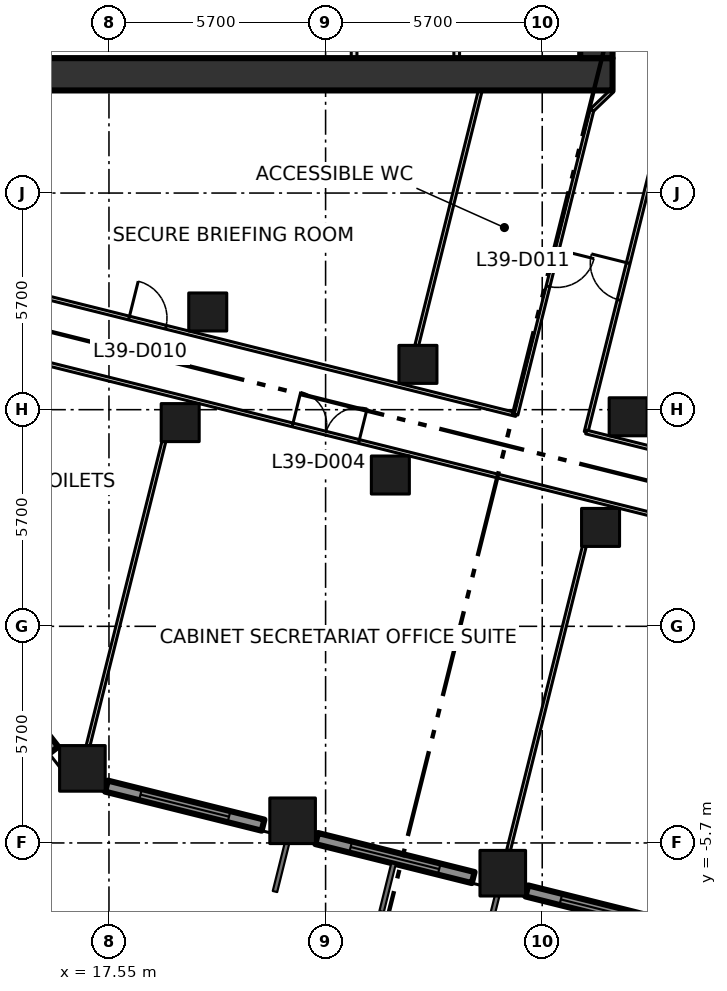
"""IFC4 building model, lengths in metres.
Left out: names, types, materials, properties, quantities, classifications, styles, units other than length and angle.
Written with IfcOpenShell. Run it as: python <this file> out.ifc"""

import sys

from ifc_helpers import new_model, si_unit, direction, frame, frame_2d, origin, origin_2d, place, context, subcontext, project, spatial, rectangle, extrude, element, fill, save


model = new_model("IFC4")
c1 = context("Model", 3, precision=1e-05, world=origin(), true_north=direction((0.0, 1.0)))
c2 = subcontext(c1, "Body", "Model", "MODEL_VIEW")
j1 = project(units=[si_unit("LENGTHUNIT", "METRE"), si_unit("PLANEANGLEUNIT", "RADIAN")], contexts=[c1])
p1 = place(None, origin())
s1 = spatial("IfcSite", under=j1, at=p1, CompositionType="ELEMENT")
p2 = place(p1, origin())
s2 = spatial("IfcBuilding", under=s1, at=p2, CompositionType="ELEMENT")
p3 = place(p2, frame((0.0, 0.0, 174.0)))
s3 = spatial("IfcBuildingStorey", under=s2, at=p3, CompositionType="ELEMENT", Elevation=174.0)
for number, where, z_axis, x_axis in (
    (1, (16.851, -3.738, 0.0), (0.0, 0.0, 1.0), (1.0, 0.0, 0.0)),
    (2, (22.382, -5.117, 0.0), (0.0, 0.0, 1.0), (1.0, 0.0, 0.0)),
    (3, (27.912, -6.496, 0.0), (0.0, 0.0, 1.0), (1.0, 0.0, 0.0)),
):
    element("IfcColumn", number, at=place(p3, frame(where, z_axis=z_axis, x_axis=x_axis)), inside=s3, PredefinedType="COLUMN", context=c2, shape_type="SweptSolid", body=[
        extrude(rectangle(XDim=1.2, YDim=1.2, at=origin_2d()), origin(), (0.0, 0.0, 1.0), 4.2),
    ])
for number, where, z_axis, x_axis in (
    (4, (19.424, 5.36, 0.0), (0.0, 0.0, 1.0), (1.0, 0.0, 0.0)),
    (5, (24.954, 3.981, 0.0), (0.0, 0.0, 1.0), (1.0, 0.0, 0.0)),
    (6, (30.485, 2.602, 0.0), (0.0, 0.0, 1.0), (1.0, 0.0, 0.0)),
    (7, (20.149, 8.271, 0.0), (0.0, 0.0, 1.0), (1.0, 0.0, 0.0)),
    (8, (25.68, 6.892, 0.0), (0.0, 0.0, 1.0), (1.0, 0.0, 0.0)),
    (9, (31.211, 5.513, 0.0), (0.0, 0.0, 1.0), (1.0, 0.0, 0.0)),
):
    element("IfcColumn", number, at=place(p3, frame(where, z_axis=z_axis, x_axis=x_axis)), inside=s3, PredefinedType="COLUMN", context=c2, shape_type="SweptSolid", body=[
        extrude(rectangle(XDim=1.0, YDim=1.0, at=origin_2d()), origin(), (0.0, 0.0, 1.0), 4.2),
    ])
p4 = place(p3, frame((8.0, 14.525, -0.3), z_axis=(0.0, 0.0, 1.0), x_axis=(1.0, 0.0, 0.0)))
e10 = element("IfcWall", 10, at=p4, inside=s3, PredefinedType="SHEAR", context=c2, shape_type="SweptSolid", body=[
    extrude(rectangle(XDim=22.8, YDim=0.85, at=frame_2d((11.4, 0.0))), origin(), (0.0, 0.0, 1.0), 4.2),
])
p5 = place(p4, frame((2.3, 0.0, 0.3)))
e11 = element("IfcOpeningElement", 11, at=p5, cuts=e10, PredefinedType="OPENING", context=c2, shape_type="SweptSolid", body=[
    extrude(rectangle(XDim=1.8, YDim=2.1, at=frame_2d((0.9, 1.05))), frame((0.0, 0.435, 0.0), z_axis=(0.0, -1.0, 0.0), x_axis=(1.0, 0.0, 0.0)), (0.0, 0.0, 1.0), 0.87),
])
p6 = place(p3, frame((30.375, 14.95, -0.3), z_axis=(0.0, 0.0, 1.0), x_axis=(0.0, 1.0, 0.0)))
e12 = element("IfcWall", 12, at=p6, inside=s3, PredefinedType="SHEAR", context=c2, shape_type="SweptSolid", body=[
    extrude(rectangle(XDim=20.75, YDim=0.85, at=frame_2d((10.375, 0.0))), origin(), (0.0, 0.0, 1.0), 4.2),
])
for number, where, z_axis, x_axis in (
    (13, (24.0, 14.95, 0.0), (0.0, 0.0, 1.0), (0.0, 1.0, 0.0)),
    (14, (26.7, 14.95, 0.0), (0.0, 0.0, 1.0), (0.0, 1.0, 0.0)),
):
    element("IfcWall", number, at=place(p3, frame(where, z_axis=z_axis, x_axis=x_axis)), inside=s3, PredefinedType="PARTITIONING", context=c2, shape_type="SweptSolid", body=[
        extrude(rectangle(XDim=2.675, YDim=0.15, at=frame_2d((1.337, 0.0))), origin(), (0.0, 0.0, 1.0), 3.9),
    ])
p7 = place(p3, frame((13.624, -0.094, 0.0), z_axis=(0.0, 0.0, 1.0), x_axis=(0.615526062586, -0.7881165309, 0.0)))
e15 = element("IfcWall", 15, at=p7, inside=s3, PredefinedType="SOLIDWALL", context=c2, shape_type="SweptSolid", body=[
    extrude(rectangle(XDim=4.016, YDim=0.3, at=frame_2d((2.008, 0.0))), origin(), (0.0, 0.0, 1.0), 3.15),
])
p8 = place(p7, frame((0.808, 0.0, 0.8)))
e16 = element("IfcOpeningElement", 16, at=p8, cuts=e15, PredefinedType="OPENING", context=c2, shape_type="SweptSolid", body=[
    extrude(rectangle(XDim=2.4, YDim=2.1, at=frame_2d((1.2, 1.05))), frame((0.0, 0.16, 0.0), z_axis=(0.0, -1.0, 0.0), x_axis=(1.0, 0.0, 0.0)), (0.0, 0.0, 1.0), 0.32),
])
p9 = place(p3, frame((17.484, -4.205, 0.0), z_axis=(0.0, 0.0, 1.0), x_axis=(0.970318118028, -0.241832069473, 0.0)))
e17 = element("IfcWall", 17, at=p9, inside=s3, PredefinedType="SOLIDWALL", context=c2, shape_type="SweptSolid", body=[
    extrude(rectangle(XDim=4.246, YDim=0.3, at=frame_2d((2.123, 0.0))), origin(), (0.0, 0.0, 1.0), 3.15),
])
p10 = place(p9, frame((0.923, 0.0, 0.8)))
e18 = element("IfcOpeningElement", 18, at=p10, cuts=e17, PredefinedType="OPENING", context=c2, shape_type="SweptSolid", body=[
    extrude(rectangle(XDim=2.4, YDim=2.1, at=frame_2d((1.2, 1.05))), frame((0.0, 0.16, 0.0), z_axis=(0.0, -1.0, 0.0), x_axis=(1.0, 0.0, 0.0)), (0.0, 0.0, 1.0), 0.32),
])
p11 = place(p3, frame((23.015, -5.584, 0.0), z_axis=(0.0, 0.0, 1.0), x_axis=(0.970291164166, -0.241940192487, 0.0)))
e19 = element("IfcWall", 19, at=p11, inside=s3, PredefinedType="SOLIDWALL", context=c2, shape_type="SweptSolid", body=[
    extrude(rectangle(XDim=4.245, YDim=0.3, at=frame_2d((2.123, 0.0))), origin(), (0.0, 0.0, 1.0), 3.15),
])
p12 = place(p11, frame((0.922, 0.0, 0.8)))
e20 = element("IfcOpeningElement", 20, at=p12, cuts=e19, PredefinedType="OPENING", context=c2, shape_type="SweptSolid", body=[
    extrude(rectangle(XDim=2.4, YDim=2.1, at=frame_2d((1.2, 1.05))), frame((0.0, 0.16, 0.0), z_axis=(0.0, -1.0, 0.0), x_axis=(1.0, 0.0, 0.0)), (0.0, 0.0, 1.0), 0.32),
])
p13 = place(p3, frame((28.545, -6.963, 0.0), z_axis=(0.0, 0.0, 1.0), x_axis=(0.97030462482, -0.241886202691, 0.0)))
e21 = element("IfcWall", 21, at=p13, inside=s3, PredefinedType="SOLIDWALL", context=c2, shape_type="SweptSolid", body=[
    extrude(rectangle(XDim=4.246, YDim=0.3, at=frame_2d((2.123, 0.0))), origin(), (0.0, 0.0, 1.0), 3.15),
])
p14 = place(p13, frame((0.923, 0.0, 0.8)))
e22 = element("IfcOpeningElement", 22, at=p14, cuts=e21, PredefinedType="OPENING", context=c2, shape_type="SweptSolid", body=[
    extrude(rectangle(XDim=2.4, YDim=2.1, at=frame_2d((1.2, 1.05))), frame((0.0, 0.16, 0.0), z_axis=(0.0, -1.0, 0.0), x_axis=(1.0, 0.0, 0.0)), (0.0, 0.0, 1.0), 0.32),
])
p15 = place(p3, frame((8.565, 8.744, 0.0), z_axis=(0.0, 0.0, 1.0), x_axis=(0.97029693432, -0.24191705035, 0.0)))
e23 = element("IfcWall", 23, at=p15, inside=s3, PredefinedType="PARTITIONING", context=c2, shape_type="SweptSolid", body=[
    extrude(rectangle(XDim=56.375, YDim=0.1, at=frame_2d((28.187, 0.0))), origin(), (0.0, 0.0, 1.0), 3.9),
])
p16 = place(p15, frame((42.739, 0.0, 0.0)))
e24 = element("IfcOpeningElement", 24, at=p16, cuts=e23, PredefinedType="OPENING", context=c2, shape_type="SweptSolid", body=[
    extrude(rectangle(XDim=1.8, YDim=2.1, at=frame_2d((0.9, 1.05))), frame((0.0, 0.06, 0.0), z_axis=(0.0, -1.0, 0.0), x_axis=(1.0, 0.0, 0.0)), (0.0, 0.0, 1.0), 0.12),
])
p17 = place(p15, frame((14.239, 0.0, 0.0)))
e25 = element("IfcOpeningElement", 25, at=p17, cuts=e23, PredefinedType="OPENING", context=c2, shape_type="SweptSolid", body=[
    extrude(rectangle(XDim=1.8, YDim=2.1, at=frame_2d((0.9, 1.05))), frame((0.0, 0.06, 0.0), z_axis=(0.0, -1.0, 0.0), x_axis=(1.0, 0.0, 0.0)), (0.0, 0.0, 1.0), 0.12),
])
p18 = place(p15, frame((29.74, 0.0, 0.0)))
e26 = element("IfcOpeningElement", 26, at=p18, cuts=e23, PredefinedType="OPENING", context=c2, shape_type="SweptSolid", body=[
    extrude(rectangle(XDim=1.8, YDim=2.1, at=frame_2d((0.9, 1.05))), frame((0.0, 0.06, 0.0), z_axis=(0.0, -1.0, 0.0), x_axis=(1.0, 0.0, 0.0)), (0.0, 0.0, 1.0), 0.12),
])
p19 = place(p15, frame((35.64, 0.0, 0.0)))
e27 = element("IfcOpeningElement", 27, at=p19, cuts=e23, PredefinedType="OPENING", context=c2, shape_type="SweptSolid", body=[
    extrude(rectangle(XDim=1.0, YDim=2.1, at=frame_2d((0.5, 1.05))), frame((0.0, 0.06, 0.0), z_axis=(0.0, -1.0, 0.0), x_axis=(1.0, 0.0, 0.0)), (0.0, 0.0, 1.0), 0.12),
])
p20 = place(p15, frame((5.28, 0.0, 0.0)))
e28 = element("IfcOpeningElement", 28, at=p20, cuts=e23, PredefinedType="OPENING", context=c2, shape_type="SweptSolid", body=[
    extrude(rectangle(XDim=1.0, YDim=2.1, at=frame_2d((0.5, 1.05))), frame((0.0, 0.06, 0.0), z_axis=(0.0, -1.0, 0.0), x_axis=(1.0, 0.0, 0.0)), (0.0, 0.0, 1.0), 0.12),
])
p21 = place(p3, frame((8.973, 10.382, 0.0), z_axis=(0.0, 0.0, 1.0), x_axis=(0.970286808807, -0.241957658808, 0.0)))
e29 = element("IfcWall", 29, at=p21, inside=s3, PredefinedType="PARTITIONING", context=c2, shape_type="SweptSolid", body=[
    extrude(rectangle(XDim=19.88, YDim=0.1, at=frame_2d((9.94, 0.0))), origin(), (0.0, 0.0, 1.0), 3.9),
])
p22 = place(p21, frame((9.384, 0.0, 0.0)))
e30 = element("IfcOpeningElement", 30, at=p22, cuts=e29, PredefinedType="OPENING", context=c2, shape_type="SweptSolid", body=[
    extrude(rectangle(XDim=1.0, YDim=2.1, at=frame_2d((0.5, 1.05))), frame((0.0, 0.06, 0.0), z_axis=(0.0, -1.0, 0.0), x_axis=(1.0, 0.0, 0.0)), (0.0, 0.0, 1.0), 0.12),
])
p23 = place(p3, frame((30.105, 5.113, 0.0), z_axis=(0.0, 0.0, 1.0), x_axis=(0.241984285369, 0.970280168629, 0.0)))
e31 = element("IfcWall", 31, at=p23, inside=s3, PredefinedType="PARTITIONING", context=c2, shape_type="SweptSolid", body=[
    extrude(rectangle(XDim=8.232, YDim=0.1, at=frame_2d((4.116, 0.0))), origin(), (0.0, 0.0, 1.0), 3.9),
])
p24 = place(p23, frame((3.58, 0.0, 0.0)))
e32 = element("IfcOpeningElement", 32, at=p24, cuts=e31, PredefinedType="OPENING", context=c2, shape_type="SweptSolid", body=[
    extrude(rectangle(XDim=1.0, YDim=2.1, at=frame_2d((0.5, 1.05))), frame((0.0, 0.06, 0.0), z_axis=(0.0, -1.0, 0.0), x_axis=(1.0, 0.0, 0.0)), (0.0, 0.0, 1.0), 0.12),
])
p25 = place(p3, frame((30.259, 13.583, 0.0), z_axis=(0.0, 0.0, 1.0), x_axis=(-0.241888494143, -0.970304053584, 0.0)))
e33 = element("IfcWall", 33, at=p25, inside=s3, PredefinedType="PARTITIONING", context=c2, shape_type="SweptSolid", body=[
    extrude(rectangle(XDim=8.256, YDim=0.1, at=frame_2d((4.128, 0.0))), origin(), (0.0, 0.0, 1.0), 3.9),
])
p26 = place(p25, frame((3.78, 0.0, 0.0)))
e34 = element("IfcOpeningElement", 34, at=p26, cuts=e33, PredefinedType="OPENING", context=c2, shape_type="SweptSolid", body=[
    extrude(rectangle(XDim=1.0, YDim=2.1, at=frame_2d((0.5, 1.05))), frame((0.0, 0.06, 0.0), z_axis=(0.0, -1.0, 0.0), x_axis=(1.0, 0.0, 0.0)), (0.0, 0.0, 1.0), 0.12),
])
p27 = place(p3, frame((30.8, 14.1, 0.0), z_axis=(0.0, 0.0, 1.0), x_axis=(-0.722911025189, -0.690941133281, 0.0)))
e35 = element("IfcWall", 35, at=p27, inside=s3, PredefinedType="PARTITIONING", context=c2, shape_type="SweptSolid", body=[
    extrude(rectangle(XDim=0.748, YDim=0.1, at=frame_2d((0.374, 0.0))), origin(), (0.0, 0.0, 1.0), 3.9),
])
p28 = place(p3, frame((49.536, 0.268, 0.0), z_axis=(0.0, 0.0, 1.0), x_axis=(-0.970292195994, 0.241936054348, 0.0)))
e36 = element("IfcWall", 36, at=p28, inside=s3, PredefinedType="PARTITIONING", context=c2, shape_type="SweptSolid", body=[
    extrude(rectangle(XDim=20.026, YDim=0.1, at=frame_2d((10.013, 0.0))), origin(), (0.0, 0.0, 1.0), 3.9),
])
p29 = place(p28, frame((9.18, 0.0, 0.0)))
e37 = element("IfcOpeningElement", 37, at=p29, cuts=e36, PredefinedType="OPENING", context=c2, shape_type="SweptSolid", body=[
    extrude(rectangle(XDim=1.8, YDim=2.1, at=frame_2d((0.9, 1.05))), frame((0.0, 0.06, 0.0), z_axis=(0.0, -1.0, 0.0), x_axis=(1.0, 0.0, 0.0)), (0.0, 0.0, 1.0), 0.12),
])
p30 = place(p3, frame((17.001, -3.138, 0.0), z_axis=(0.0, 0.0, 1.0), x_axis=(0.241922303467, 0.970295624583, 0.0)))
e38 = element("IfcWall", 38, at=p30, inside=s3, PredefinedType="PARTITIONING", context=c2, shape_type="SweptSolid", body=[
    extrude(rectangle(XDim=8.243, YDim=0.1, at=frame_2d((4.122, 0.0))), origin(), (0.0, 0.0, 1.0), 3.9),
])
p31 = place(p3, frame((25.649, 7.392, 0.0), z_axis=(0.0, 0.0, 1.0), x_axis=(0.241870819599, 0.970308459525, 0.0)))
e39 = element("IfcWall", 39, at=p31, inside=s3, PredefinedType="PARTITIONING", context=c2, shape_type="SweptSolid", body=[
    extrude(rectangle(XDim=6.913, YDim=0.1, at=frame_2d((3.457, 0.0))), origin(), (0.0, 0.0, 1.0), 3.9),
])
p32 = place(p3, frame((28.063, -5.896, 0.0), z_axis=(0.0, 0.0, 1.0), x_axis=(0.241894418317, 0.970302576719, 0.0)))
e40 = element("IfcWall", 40, at=p32, inside=s3, PredefinedType="PARTITIONING", context=c2, shape_type="SweptSolid", body=[
    extrude(rectangle(XDim=8.243, YDim=0.1, at=frame_2d((4.122, 0.0))), origin(), (0.0, 0.0, 1.0), 3.9),
])
p33 = place(p10, origin())
e41 = element("IfcWindow", 41, at=p33, inside=s3, PartitioningType="DOUBLE_PANEL_VERTICAL", PredefinedType="WINDOW", context=c2, shape_type="SweptSolid", body=[
    extrude(rectangle(XDim=2.4, YDim=2.1, at=frame_2d((1.2, 1.05))), frame((0.0, 0.03, 0.0), z_axis=(0.0, -1.0, 0.0), x_axis=(1.0, 0.0, 0.0)), (0.0, 0.0, 1.0), 0.06),
])
fill(e18, e41)
p34 = place(p12, origin())
e42 = element("IfcWindow", 42, at=p34, inside=s3, PartitioningType="DOUBLE_PANEL_VERTICAL", PredefinedType="WINDOW", context=c2, shape_type="SweptSolid", body=[
    extrude(rectangle(XDim=2.4, YDim=2.1, at=frame_2d((1.2, 1.05))), frame((0.0, 0.03, 0.0), z_axis=(0.0, -1.0, 0.0), x_axis=(1.0, 0.0, 0.0)), (0.0, 0.0, 1.0), 0.06),
])
fill(e20, e42)
p35 = place(p14, origin())
e43 = element("IfcWindow", 43, at=p35, inside=s3, PartitioningType="DOUBLE_PANEL_VERTICAL", PredefinedType="WINDOW", context=c2, shape_type="SweptSolid", body=[
    extrude(rectangle(XDim=2.4, YDim=2.1, at=frame_2d((1.2, 1.05))), frame((0.0, 0.03, 0.0), z_axis=(0.0, -1.0, 0.0), x_axis=(1.0, 0.0, 0.0)), (0.0, 0.0, 1.0), 0.06),
])
fill(e22, e43)
p36 = place(p17, origin())
e44 = element("IfcDoor", 44, at=p36, inside=s3, OperationType="DOUBLE_DOOR_SINGLE_SWING", PredefinedType="DOOR", context=c2, shape_type="SweptSolid", body=[
    extrude(rectangle(XDim=1.8, YDim=2.1, at=frame_2d((0.9, 1.05))), frame((0.0, 0.025, 0.0), z_axis=(0.0, -1.0, 0.0), x_axis=(1.0, 0.0, 0.0)), (0.0, 0.0, 1.0), 0.05),
])
fill(e25, e44)
p37 = place(p22, origin())
e45 = element("IfcDoor", 45, at=p37, inside=s3, OperationType="SINGLE_SWING_LEFT", PredefinedType="DOOR", context=c2, shape_type="SweptSolid", body=[
    extrude(rectangle(XDim=1.0, YDim=2.1, at=frame_2d((0.5, 1.05))), frame((0.0, 0.025, 0.0), z_axis=(0.0, -1.0, 0.0), x_axis=(1.0, 0.0, 0.0)), (0.0, 0.0, 1.0), 0.05),
])
fill(e30, e45)
p38 = place(p26, origin())
e46 = element("IfcDoor", 46, at=p38, inside=s3, OperationType="SINGLE_SWING_LEFT", PredefinedType="DOOR", context=c2, shape_type="SweptSolid", body=[
    extrude(rectangle(XDim=1.0, YDim=2.1, at=frame_2d((0.5, 1.05))), frame((0.0, 0.025, 0.0), z_axis=(0.0, -1.0, 0.0), x_axis=(1.0, 0.0, 0.0)), (0.0, 0.0, 1.0), 0.05),
])
fill(e34, e46)
p39 = place(p24, origin())
e47 = element("IfcDoor", 47, at=p39, inside=s3, OperationType="SINGLE_SWING_RIGHT", PredefinedType="DOOR", context=c2, shape_type="SweptSolid", body=[
    extrude(rectangle(XDim=1.0, YDim=2.1, at=frame_2d((0.5, 1.05))), frame((0.0, 0.025, 0.0), z_axis=(0.0, -1.0, 0.0), x_axis=(1.0, 0.0, 0.0)), (0.0, 0.0, 1.0), 0.05),
])
fill(e32, e47)
save(model, sys.argv[1])
